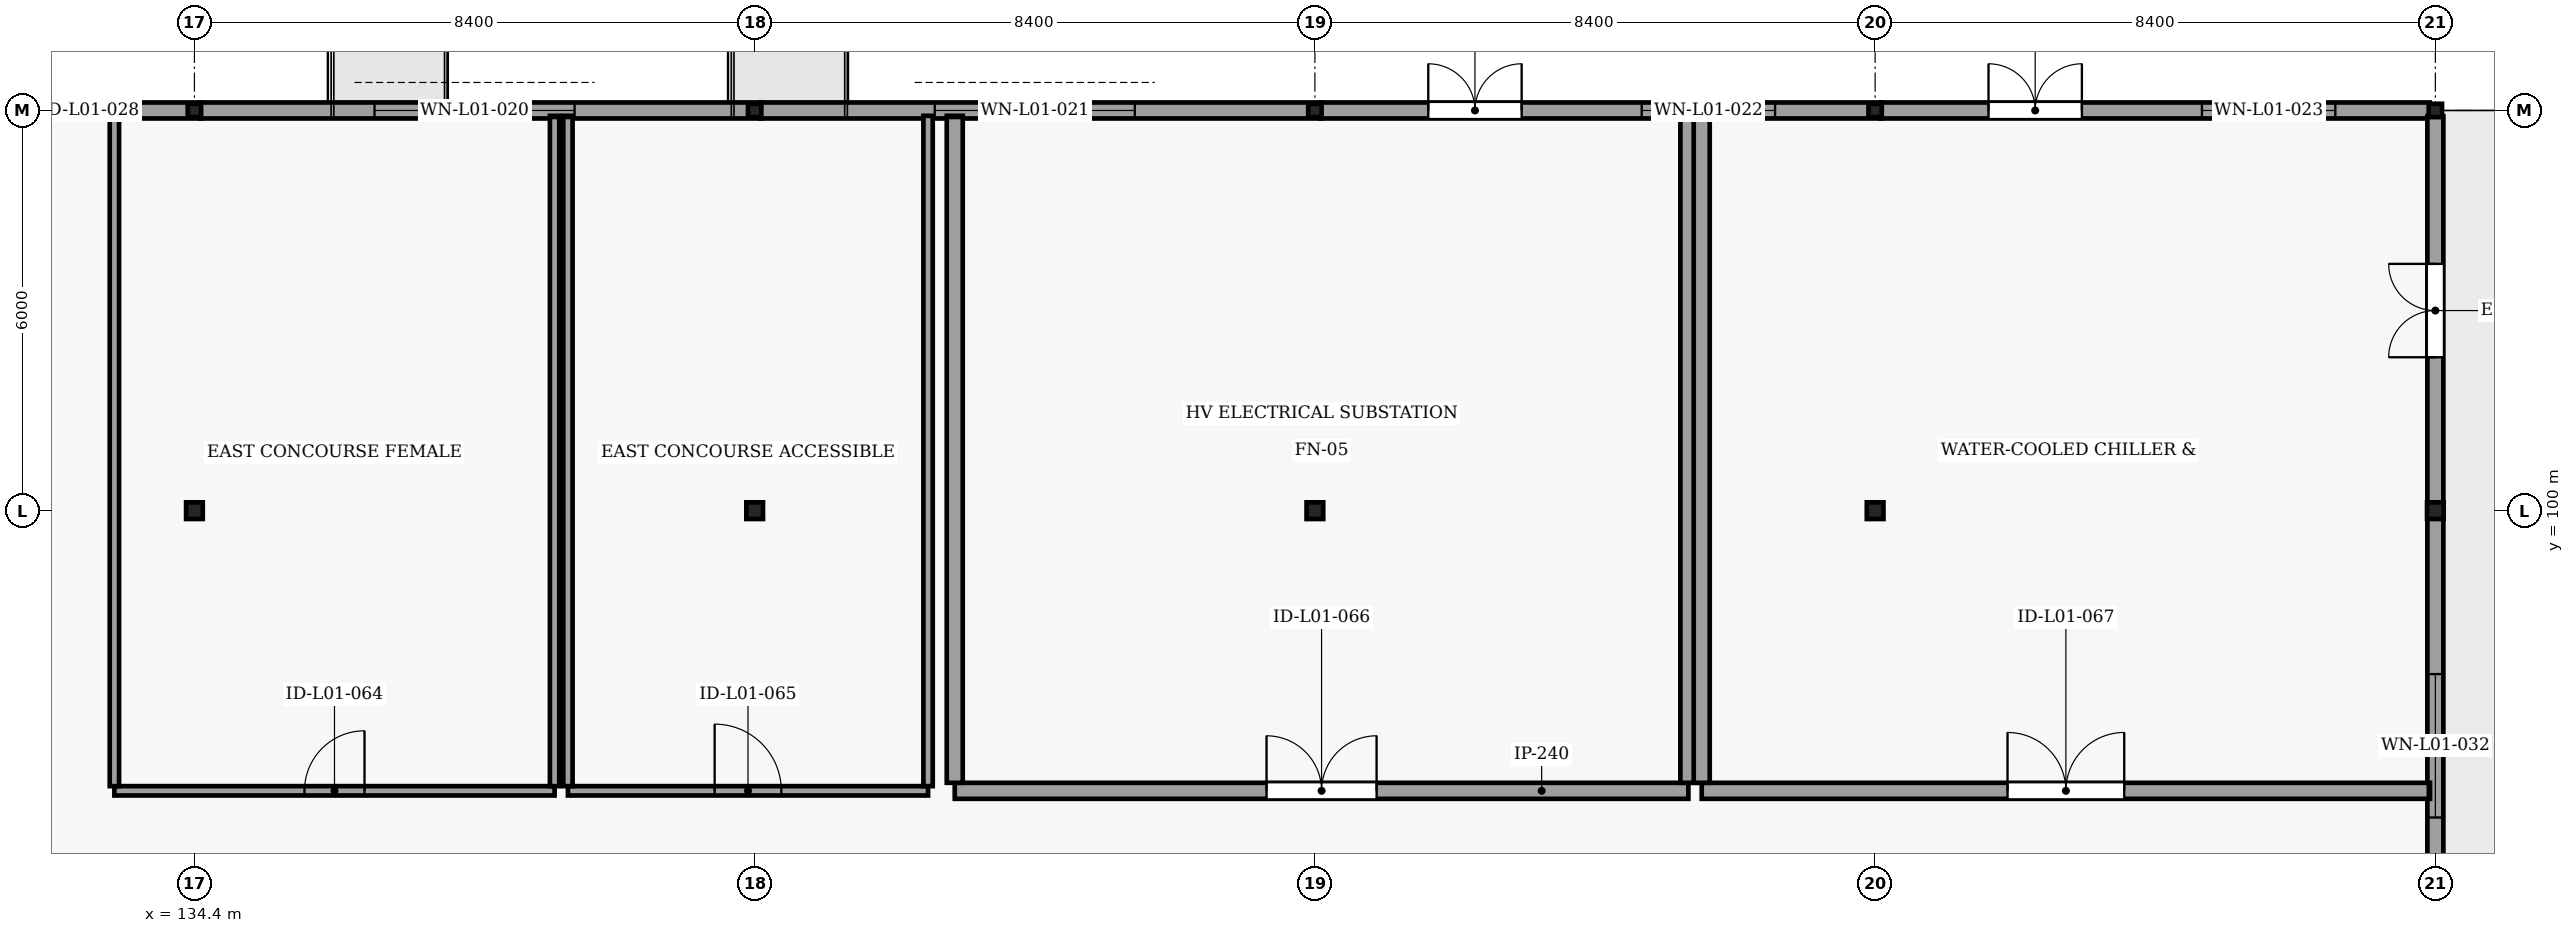
"""IFC4 building model, lengths in metres.
Left out: names, types, materials, properties, quantities, classifications, styles, units other than length and angle.
Written with IfcOpenShell. Run it as: python <this file> out.ifc"""

import sys

from ifc_helpers import new_model, si_unit, direction, frame, frame_2d, origin, origin_2d, place, context, subcontext, project, spatial, rectangle, hollow_rectangle, extrude, element, fill, save


model = new_model("IFC4")
c1 = context("Model", 3, precision=1e-05, world=origin(), true_north=direction((0.0, 1.0)))
c2 = subcontext(c1, "Body", "Model", "MODEL_VIEW")
j1 = project(units=[si_unit("LENGTHUNIT", "METRE"), si_unit("PLANEANGLEUNIT", "RADIAN")], contexts=[c1])
p1 = place(None, origin())
s1 = spatial("IfcSite", under=j1, at=p1, CompositionType="ELEMENT")
p2 = place(p1, origin())
s2 = spatial("IfcBuilding", under=s1, at=p2, CompositionType="ELEMENT")
p3 = place(p2, origin())
s3 = spatial("IfcBuildingStorey", under=s2, at=p3, CompositionType="ELEMENT", Elevation=0.0)
for number, where, z_axis, x_axis in (
    (1, (134.4, 100.0, -0.45), (0.0, 0.0, 1.0), (1.0, 0.0, 0.0)),
    (2, (142.8, 100.0, -0.45), (0.0, 0.0, 1.0), (1.0, 0.0, 0.0)),
    (3, (151.2, 100.0, -0.45), (0.0, 0.0, 1.0), (1.0, 0.0, 0.0)),
    (4, (159.6, 100.0, -0.45), (0.0, 0.0, 1.0), (1.0, 0.0, 0.0)),
    (5, (168.0, 100.0, -0.45), (0.0, 0.0, 1.0), (1.0, 0.0, 0.0)),
):
    element("IfcColumn", number, at=place(p3, frame(where, z_axis=z_axis, x_axis=x_axis)), inside=s3, PredefinedType="COLUMN", context=c2, shape_type="SweptSolid", body=[
        extrude(hollow_rectangle(XDim=0.25, YDim=0.25, WallThickness=0.012, InnerFilletRadius=0.012, OuterFilletRadius=0.025, at=origin_2d()), origin(), (0.0, 0.0, 1.0), 5.57),
    ])
for number, where, z_axis, x_axis in (
    (6, (134.4, 106.0, -0.45), (0.0, 0.0, 1.0), (1.0, 0.0, 0.0)),
    (7, (142.8, 106.0, -0.45), (0.0, 0.0, 1.0), (1.0, 0.0, 0.0)),
    (8, (151.2, 106.0, -0.45), (0.0, 0.0, 1.0), (1.0, 0.0, 0.0)),
    (9, (159.6, 106.0, -0.45), (0.0, 0.0, 1.0), (1.0, 0.0, 0.0)),
    (10, (168.0, 106.0, -0.45), (0.0, 0.0, 1.0), (1.0, 0.0, 0.0)),
):
    element("IfcColumn", number, at=place(p3, frame(where, z_axis=z_axis, x_axis=x_axis)), inside=s3, PredefinedType="COLUMN", context=c2, shape_type="SweptSolid", body=[
        extrude(hollow_rectangle(XDim=0.2, YDim=0.2, WallThickness=0.01, InnerFilletRadius=0.01, OuterFilletRadius=0.02, at=origin_2d()), origin(), (0.0, 0.0, 1.0), 5.57),
    ])
p4 = place(p3, frame((126.169, 106.0, 0.0), z_axis=(0.0, 0.0, 1.0), x_axis=(1.0, 0.0, 0.0)))
e11 = element("IfcWall", 11, at=p4, inside=s3, PredefinedType="ELEMENTEDWALL", context=c2, shape_type="SweptSolid", body=[
    extrude(rectangle(XDim=8.328, YDim=0.24, at=frame_2d((4.164, 0.0))), origin(), (0.0, 0.0, 1.0), 4.658),
])
p5 = place(p4, frame((2.831, 0.0, 0.0)))
e12 = element("IfcOpeningElement", 12, at=p5, cuts=e11, PredefinedType="OPENING", context=c2, shape_type="SweptSolid", body=[
    extrude(rectangle(XDim=2.4, YDim=2.4, at=frame_2d((1.2, 1.2))), frame((0.0, 0.13, 0.0), z_axis=(0.0, -1.0, 0.0), x_axis=(1.0, 0.0, 0.0)), (0.0, 0.0, 1.0), 0.26),
])
p6 = place(p3, frame((134.485, 106.0, 0.0), z_axis=(0.0, 0.0, 1.0), x_axis=(1.0, 0.0, 0.0)))
e13 = element("IfcWall", 13, at=p6, inside=s3, PredefinedType="ELEMENTEDWALL", context=c2, shape_type="SweptSolid", body=[
    extrude(rectangle(XDim=8.412, YDim=0.24, at=frame_2d((4.206, 0.0))), origin(), (0.0, 0.0, 1.0), 4.658),
])
p7 = place(p6, frame((2.615, 0.0, 1.0)))
e14 = element("IfcOpeningElement", 14, at=p7, cuts=e13, PredefinedType="OPENING", context=c2, shape_type="SweptSolid", body=[
    extrude(rectangle(XDim=3.0, YDim=1.6, at=frame_2d((1.5, 0.8))), frame((0.0, 0.13, 0.0), z_axis=(0.0, -1.0, 0.0), x_axis=(1.0, 0.0, 0.0)), (0.0, 0.0, 1.0), 0.26),
])
p8 = place(p3, frame((142.885, 106.0, 0.0), z_axis=(0.0, 0.0, 1.0), x_axis=(1.0, 0.0, 0.0)))
e15 = element("IfcWall", 15, at=p8, inside=s3, PredefinedType="ELEMENTEDWALL", context=c2, shape_type="SweptSolid", body=[
    extrude(rectangle(XDim=8.412, YDim=0.24, at=frame_2d((4.206, 0.0))), origin(), (0.0, 0.0, 1.0), 4.658),
])
p9 = place(p8, frame((2.615, 0.0, 1.0)))
e16 = element("IfcOpeningElement", 16, at=p9, cuts=e15, PredefinedType="OPENING", context=c2, shape_type="SweptSolid", body=[
    extrude(rectangle(XDim=3.0, YDim=1.6, at=frame_2d((1.5, 0.8))), frame((0.0, 0.13, 0.0), z_axis=(0.0, -1.0, 0.0), x_axis=(1.0, 0.0, 0.0)), (0.0, 0.0, 1.0), 0.26),
])
p10 = place(p3, frame((151.285, 106.0, 0.0), z_axis=(0.0, 0.0, 1.0), x_axis=(1.0, 0.0, 0.0)))
e17 = element("IfcWall", 17, at=p10, inside=s3, PredefinedType="ELEMENTEDWALL", context=c2, shape_type="SweptSolid", body=[
    extrude(rectangle(XDim=8.412, YDim=0.24, at=frame_2d((4.206, 0.0))), origin(), (0.0, 0.0, 1.0), 4.658),
])
p11 = place(p10, frame((1.615, 0.0, 0.0)))
e18 = element("IfcOpeningElement", 18, at=p11, cuts=e17, PredefinedType="OPENING", context=c2, shape_type="SweptSolid", body=[
    extrude(rectangle(XDim=1.4, YDim=2.2, at=frame_2d((0.7, 1.1))), frame((0.0, 0.13, 0.0), z_axis=(0.0, -1.0, 0.0), x_axis=(1.0, 0.0, 0.0)), (0.0, 0.0, 1.0), 0.26),
])
p12 = place(p10, frame((4.815, 0.0, 1.4)))
e19 = element("IfcOpeningElement", 19, at=p12, cuts=e17, PredefinedType="OPENING", context=c2, shape_type="SweptSolid", body=[
    extrude(rectangle(XDim=2.0, YDim=1.2, at=frame_2d((1.0, 0.6))), frame((0.0, 0.13, 0.0), z_axis=(0.0, -1.0, 0.0), x_axis=(1.0, 0.0, 0.0)), (0.0, 0.0, 1.0), 0.26),
])
p13 = place(p3, frame((159.685, 106.0, 0.0), z_axis=(0.0, 0.0, 1.0), x_axis=(1.0, 0.0, 0.0)))
e20 = element("IfcWall", 20, at=p13, inside=s3, PredefinedType="ELEMENTEDWALL", context=c2, shape_type="SweptSolid", body=[
    extrude(rectangle(XDim=8.23, YDim=0.24, at=frame_2d((4.115, 0.0))), origin(), (0.0, 0.0, 1.0), 4.658),
])
p14 = place(p13, frame((1.615, 0.0, 0.0)))
e21 = element("IfcOpeningElement", 21, at=p14, cuts=e20, PredefinedType="OPENING", context=c2, shape_type="SweptSolid", body=[
    extrude(rectangle(XDim=1.4, YDim=2.2, at=frame_2d((0.7, 1.1))), frame((0.0, 0.13, 0.0), z_axis=(0.0, -1.0, 0.0), x_axis=(1.0, 0.0, 0.0)), (0.0, 0.0, 1.0), 0.26),
])
p15 = place(p13, frame((4.815, 0.0, 1.4)))
e22 = element("IfcOpeningElement", 22, at=p15, cuts=e20, PredefinedType="OPENING", context=c2, shape_type="SweptSolid", body=[
    extrude(rectangle(XDim=2.0, YDim=1.2, at=frame_2d((1.0, 0.6))), frame((0.0, 0.13, 0.0), z_axis=(0.0, -1.0, 0.0), x_axis=(1.0, 0.0, 0.0)), (0.0, 0.0, 1.0), 0.26),
])
p16 = place(p3, frame((168.0, 89.11, 0.0), z_axis=(0.0, 0.0, 1.0), x_axis=(0.0, 1.0, 0.0)))
e23 = element("IfcWall", 23, at=p16, inside=s3, PredefinedType="ELEMENTEDWALL", context=c2, shape_type="SweptSolid", body=[
    extrude(rectangle(XDim=11.012, YDim=0.24, at=frame_2d((5.506, 0.0))), origin(), (0.0, 0.0, 1.0), 4.701),
])
p17 = place(p16, frame((2.39, 0.0, 1.4)))
e24 = element("IfcOpeningElement", 24, at=p17, cuts=e23, PredefinedType="OPENING", context=c2, shape_type="SweptSolid", body=[
    extrude(rectangle(XDim=2.0, YDim=1.2, at=frame_2d((1.0, 0.6))), frame((0.0, 0.13, 0.0), z_axis=(0.0, -1.0, 0.0), x_axis=(1.0, 0.0, 0.0)), (0.0, 0.0, 1.0), 0.26),
])
p18 = place(p16, frame((6.29, 0.0, 1.4)))
e25 = element("IfcOpeningElement", 25, at=p18, cuts=e23, PredefinedType="OPENING", context=c2, shape_type="SweptSolid", body=[
    extrude(rectangle(XDim=2.15, YDim=1.25, at=frame_2d((1.075, 0.625))), frame((0.0, 0.13, 0.0), z_axis=(0.0, -1.0, 0.0), x_axis=(1.0, 0.0, 0.0)), (0.0, 0.0, 1.0), 0.26),
])
p19 = place(p3, frame((168.0, 100.11, 0.0), z_axis=(0.0, 0.0, 1.0), x_axis=(0.0, 1.0, 0.0)))
e26 = element("IfcWall", 26, at=p19, inside=s3, PredefinedType="ELEMENTEDWALL", context=c2, shape_type="SweptSolid", body=[
    extrude(rectangle(XDim=5.805, YDim=0.24, at=frame_2d((2.902, 0.0))), origin(), (0.0, 0.0, 1.0), 4.701),
])
p20 = place(p19, frame((2.19, 0.0, 0.0)))
e27 = element("IfcOpeningElement", 27, at=p20, cuts=e26, PredefinedType="OPENING", context=c2, shape_type="SweptSolid", body=[
    extrude(rectangle(XDim=1.4, YDim=2.2, at=frame_2d((0.7, 1.1))), frame((0.0, 0.13, 0.0), z_axis=(0.0, -1.0, 0.0), x_axis=(1.0, 0.0, 0.0)), (0.0, 0.0, 1.0), 0.26),
])
p21 = place(p3, frame((133.2, 95.8, 0.0), z_axis=(0.0, 0.0, 1.0), x_axis=(1.0, 0.0, 0.0)))
e28 = element("IfcWall", 28, at=p21, inside=s3, PredefinedType="PARTITIONING", context=c2, shape_type="SweptSolid", body=[
    extrude(rectangle(XDim=6.6, YDim=0.14, at=frame_2d((3.3, 0.0))), origin(), (0.0, 0.0, 1.0), 4.703),
])
p22 = place(p21, frame((2.85, 0.0, 0.0)))
e29 = element("IfcOpeningElement", 29, at=p22, cuts=e28, PredefinedType="OPENING", context=c2, shape_type="SweptSolid", body=[
    extrude(rectangle(XDim=0.9, YDim=2.1, at=frame_2d((0.45, 1.05))), frame((0.0, 0.08, 0.0), z_axis=(0.0, -1.0, 0.0), x_axis=(1.0, 0.0, 0.0)), (0.0, 0.0, 1.0), 0.16),
])
for number, where, z_axis, x_axis in (
    (30, (133.2, 95.87, 0.0), (0.0, 0.0, 1.0), (0.0, 1.0, 0.0)),
    (31, (139.8, 95.87, 0.0), (0.0, 0.0, 1.0), (0.0, 1.0, 0.0)),
):
    element("IfcWall", number, at=place(p3, frame(where, z_axis=z_axis, x_axis=x_axis)), inside=s3, PredefinedType="PARTITIONING", context=c2, shape_type="SweptSolid", body=[
        extrude(rectangle(XDim=10.05, YDim=0.14, at=frame_2d((5.025, 0.0))), origin(), (0.0, 0.0, 1.0), 4.66),
    ])
p23 = place(p3, frame((140.0, 95.8, 0.0), z_axis=(0.0, 0.0, 1.0), x_axis=(1.0, 0.0, 0.0)))
e32 = element("IfcWall", 32, at=p23, inside=s3, PredefinedType="PARTITIONING", context=c2, shape_type="SweptSolid", body=[
    extrude(rectangle(XDim=5.4, YDim=0.14, at=frame_2d((2.7, 0.0))), origin(), (0.0, 0.0, 1.0), 4.703),
])
p24 = place(p23, frame((2.2, 0.0, 0.0)))
e33 = element("IfcOpeningElement", 33, at=p24, cuts=e32, PredefinedType="OPENING", context=c2, shape_type="SweptSolid", body=[
    extrude(rectangle(XDim=1.0, YDim=2.15, at=frame_2d((0.5, 1.075))), frame((0.0, 0.08, 0.0), z_axis=(0.0, -1.0, 0.0), x_axis=(1.0, 0.0, 0.0)), (0.0, 0.0, 1.0), 0.16),
])
for number, where, z_axis, x_axis in (
    (34, (140.0, 95.87, 0.0), (0.0, 0.0, 1.0), (0.0, 1.0, 0.0)),
    (35, (145.4, 95.87, 0.0), (0.0, 0.0, 1.0), (0.0, 1.0, 0.0)),
):
    element("IfcWall", number, at=place(p3, frame(where, z_axis=z_axis, x_axis=x_axis)), inside=s3, PredefinedType="PARTITIONING", context=c2, shape_type="SweptSolid", body=[
        extrude(rectangle(XDim=10.05, YDim=0.14, at=frame_2d((5.025, 0.0))), origin(), (0.0, 0.0, 1.0), 4.66),
    ])
p25 = place(p3, frame((145.8, 95.8, 0.0), z_axis=(0.0, 0.0, 1.0), x_axis=(1.0, 0.0, 0.0)))
e36 = element("IfcWall", 36, at=p25, inside=s3, PredefinedType="SOLIDWALL", context=c2, shape_type="SweptSolid", body=[
    extrude(rectangle(XDim=11.0, YDim=0.24, at=frame_2d((5.5, 0.0))), origin(), (0.0, 0.0, 1.0), 4.703),
])
p26 = place(p25, frame((4.675, 0.0, 0.0)))
e37 = element("IfcOpeningElement", 37, at=p26, cuts=e36, PredefinedType="OPENING", context=c2, shape_type="SweptSolid", body=[
    extrude(rectangle(XDim=1.65, YDim=2.35, at=frame_2d((0.825, 1.175))), frame((0.0, 0.13, 0.0), z_axis=(0.0, -1.0, 0.0), x_axis=(1.0, 0.0, 0.0)), (0.0, 0.0, 1.0), 0.26),
])
for number, where, z_axis, x_axis in (
    (38, (145.8, 95.92, 0.0), (0.0, 0.0, 1.0), (0.0, 1.0, 0.0)),
    (39, (156.8, 95.92, 0.0), (0.0, 0.0, 1.0), (0.0, 1.0, 0.0)),
):
    element("IfcWall", number, at=place(p3, frame(where, z_axis=z_axis, x_axis=x_axis)), inside=s3, PredefinedType="SOLIDWALL", context=c2, shape_type="SweptSolid", body=[
        extrude(rectangle(XDim=10.0, YDim=0.24, at=frame_2d((5.0, 0.0))), origin(), (0.0, 0.0, 1.0), 4.66),
    ])
p27 = place(p3, frame((157.0, 95.8, 0.0), z_axis=(0.0, 0.0, 1.0), x_axis=(1.0, 0.0, 0.0)))
e40 = element("IfcWall", 40, at=p27, inside=s3, PredefinedType="SOLIDWALL", context=c2, shape_type="SweptSolid", body=[
    extrude(rectangle(XDim=10.92, YDim=0.24, at=frame_2d((5.46, 0.0))), origin(), (0.0, 0.0, 1.0), 4.703),
])
p28 = place(p27, frame((4.585, 0.0, 0.0)))
e41 = element("IfcOpeningElement", 41, at=p28, cuts=e40, PredefinedType="OPENING", context=c2, shape_type="SweptSolid", body=[
    extrude(rectangle(XDim=1.75, YDim=2.35, at=frame_2d((0.875, 1.175))), frame((0.0, 0.13, 0.0), z_axis=(0.0, -1.0, 0.0), x_axis=(1.0, 0.0, 0.0)), (0.0, 0.0, 1.0), 0.26),
])
p29 = place(p3, frame((157.0, 95.92, 0.0), z_axis=(0.0, 0.0, 1.0), x_axis=(0.0, 1.0, 0.0)))
e42 = element("IfcWall", 42, at=p29, inside=s3, PredefinedType="SOLIDWALL", context=c2, shape_type="SweptSolid", body=[
    extrude(rectangle(XDim=10.0, YDim=0.24, at=frame_2d((5.0, 0.0))), origin(), (0.0, 0.0, 1.0), 4.66),
])
p30 = place(p7, origin())
e43 = element("IfcWindow", 43, at=p30, inside=s3, PartitioningType="SINGLE_PANEL", PredefinedType="WINDOW", context=c2, shape_type="SweptSolid", body=[
    extrude(rectangle(XDim=3.0, YDim=1.6, at=frame_2d((1.5, 0.8))), frame((0.0, 0.03, 0.0), z_axis=(0.0, -1.0, 0.0), x_axis=(1.0, 0.0, 0.0)), (0.0, 0.0, 1.0), 0.06),
])
fill(e14, e43)
p31 = place(p9, origin())
e44 = element("IfcWindow", 44, at=p31, inside=s3, PartitioningType="SINGLE_PANEL", PredefinedType="WINDOW", context=c2, shape_type="SweptSolid", body=[
    extrude(rectangle(XDim=3.0, YDim=1.6, at=frame_2d((1.5, 0.8))), frame((0.0, 0.03, 0.0), z_axis=(0.0, -1.0, 0.0), x_axis=(1.0, 0.0, 0.0)), (0.0, 0.0, 1.0), 0.06),
])
fill(e16, e44)
p32 = place(p11, origin())
e45 = element("IfcDoor", 45, at=p32, inside=s3, OperationType="DOUBLE_DOOR_SINGLE_SWING", PredefinedType="DOOR", context=c2, shape_type="SweptSolid", body=[
    extrude(rectangle(XDim=1.4, YDim=2.2, at=frame_2d((0.7, 1.1))), frame((0.0, 0.025, 0.0), z_axis=(0.0, -1.0, 0.0), x_axis=(1.0, 0.0, 0.0)), (0.0, 0.0, 1.0), 0.05),
])
fill(e18, e45)
p33 = place(p12, origin())
e46 = element("IfcWindow", 46, at=p33, inside=s3, PartitioningType="SINGLE_PANEL", PredefinedType="WINDOW", context=c2, shape_type="SweptSolid", body=[
    extrude(rectangle(XDim=2.0, YDim=1.2, at=frame_2d((1.0, 0.6))), frame((0.0, 0.03, 0.0), z_axis=(0.0, -1.0, 0.0), x_axis=(1.0, 0.0, 0.0)), (0.0, 0.0, 1.0), 0.06),
])
fill(e19, e46)
p34 = place(p14, origin())
e47 = element("IfcDoor", 47, at=p34, inside=s3, OperationType="DOUBLE_DOOR_SINGLE_SWING", PredefinedType="DOOR", context=c2, shape_type="SweptSolid", body=[
    extrude(rectangle(XDim=1.4, YDim=2.2, at=frame_2d((0.7, 1.1))), frame((0.0, 0.025, 0.0), z_axis=(0.0, -1.0, 0.0), x_axis=(1.0, 0.0, 0.0)), (0.0, 0.0, 1.0), 0.05),
])
fill(e21, e47)
p35 = place(p15, origin())
e48 = element("IfcWindow", 48, at=p35, inside=s3, PartitioningType="SINGLE_PANEL", PredefinedType="WINDOW", context=c2, shape_type="SweptSolid", body=[
    extrude(rectangle(XDim=2.0, YDim=1.2, at=frame_2d((1.0, 0.6))), frame((0.0, 0.03, 0.0), z_axis=(0.0, -1.0, 0.0), x_axis=(1.0, 0.0, 0.0)), (0.0, 0.0, 1.0), 0.06),
])
fill(e22, e48)
p36 = place(p18, origin())
e49 = element("IfcWindow", 49, at=p36, inside=s3, PartitioningType="SINGLE_PANEL", PredefinedType="WINDOW", context=c2, shape_type="SweptSolid", body=[
    extrude(rectangle(XDim=2.15, YDim=1.25, at=frame_2d((1.075, 0.625))), frame((0.0, 0.03, 0.0), z_axis=(0.0, -1.0, 0.0), x_axis=(1.0, 0.0, 0.0)), (0.0, 0.0, 1.0), 0.06),
])
fill(e25, e49)
p37 = place(p20, origin())
e50 = element("IfcDoor", 50, at=p37, inside=s3, OperationType="DOUBLE_DOOR_SINGLE_SWING", PredefinedType="DOOR", context=c2, shape_type="SweptSolid", body=[
    extrude(rectangle(XDim=1.4, YDim=2.2, at=frame_2d((0.7, 1.1))), frame((0.0, 0.025, 0.0), z_axis=(0.0, -1.0, 0.0), x_axis=(1.0, 0.0, 0.0)), (0.0, 0.0, 1.0), 0.05),
])
fill(e27, e50)
p38 = place(p22, origin())
e51 = element("IfcDoor", 51, at=p38, inside=s3, OperationType="SINGLE_SWING_RIGHT", PredefinedType="DOOR", context=c2, shape_type="SweptSolid", body=[
    extrude(rectangle(XDim=0.9, YDim=2.1, at=frame_2d((0.45, 1.05))), frame((0.0, 0.025, 0.0), z_axis=(0.0, -1.0, 0.0), x_axis=(1.0, 0.0, 0.0)), (0.0, 0.0, 1.0), 0.05),
])
fill(e29, e51)
p39 = place(p24, origin())
e52 = element("IfcDoor", 52, at=p39, inside=s3, OperationType="SINGLE_SWING_LEFT", PredefinedType="DOOR", context=c2, shape_type="SweptSolid", body=[
    extrude(rectangle(XDim=1.0, YDim=2.15, at=frame_2d((0.5, 1.075))), frame((0.0, 0.025, 0.0), z_axis=(0.0, -1.0, 0.0), x_axis=(1.0, 0.0, 0.0)), (0.0, 0.0, 1.0), 0.05),
])
fill(e33, e52)
p40 = place(p26, origin())
e53 = element("IfcDoor", 53, at=p40, inside=s3, OperationType="DOUBLE_DOOR_SINGLE_SWING", PredefinedType="DOOR", context=c2, shape_type="SweptSolid", body=[
    extrude(rectangle(XDim=1.65, YDim=2.35, at=frame_2d((0.825, 1.175))), frame((0.0, 0.025, 0.0), z_axis=(0.0, -1.0, 0.0), x_axis=(1.0, 0.0, 0.0)), (0.0, 0.0, 1.0), 0.05),
])
fill(e37, e53)
p41 = place(p28, origin())
e54 = element("IfcDoor", 54, at=p41, inside=s3, OperationType="DOUBLE_DOOR_SINGLE_SWING", PredefinedType="DOOR", context=c2, shape_type="SweptSolid", body=[
    extrude(rectangle(XDim=1.75, YDim=2.35, at=frame_2d((0.875, 1.175))), frame((0.0, 0.025, 0.0), z_axis=(0.0, -1.0, 0.0), x_axis=(1.0, 0.0, 0.0)), (0.0, 0.0, 1.0), 0.05),
])
fill(e41, e54)
save(model, sys.argv[1])
